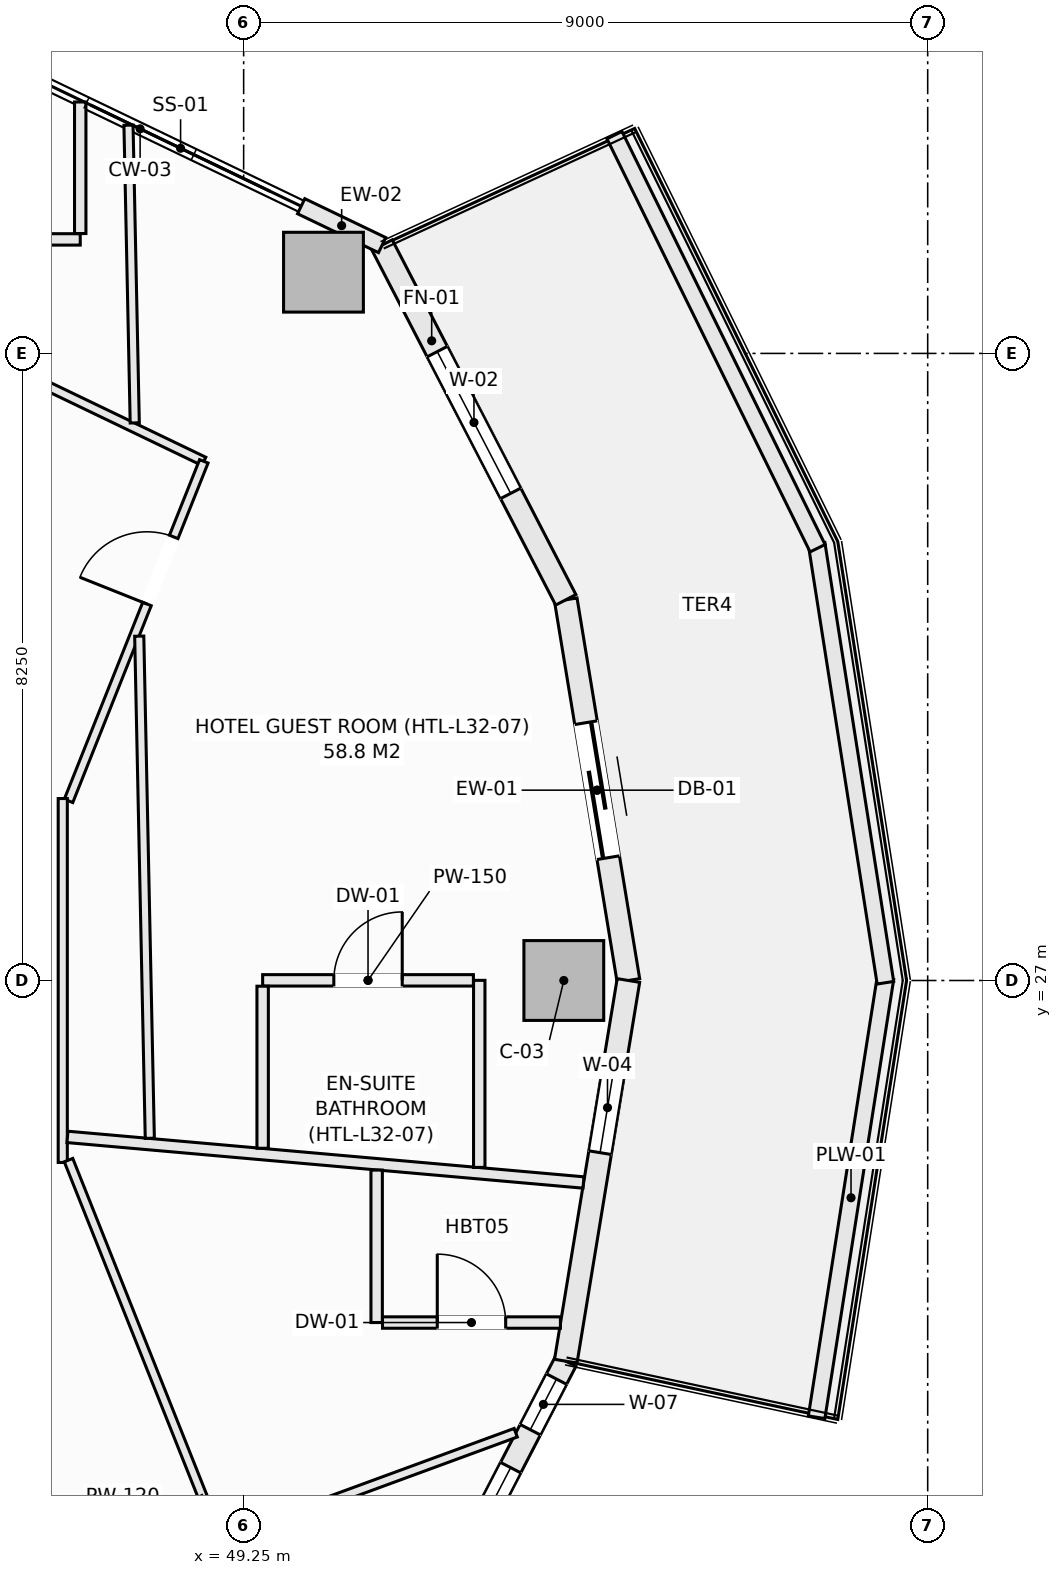
"""IFC4 building model, lengths in metres.
Left out: names, types, materials, properties, quantities, classifications, styles, units other than length and angle.
Written with IfcOpenShell. Run it as: python <this file> out.ifc"""

import sys

from ifc_helpers import new_model, si_unit, direction, frame, frame_2d, origin, origin_2d, place, context, subcontext, project, spatial, rectangle, extrude, element, fill, save


model = new_model("IFC4")
c1 = context("Model", 3, precision=1e-05, world=origin(), true_north=direction((0.0, 1.0)))
c2 = subcontext(c1, "Body", "Model", "MODEL_VIEW")
j1 = project(units=[si_unit("LENGTHUNIT", "METRE"), si_unit("PLANEANGLEUNIT", "RADIAN")], contexts=[c1])
p1 = place(None, origin())
s1 = spatial("IfcSite", under=j1, at=p1, CompositionType="ELEMENT")
p2 = place(p1, origin())
s2 = spatial("IfcBuilding", under=s1, at=p2, CompositionType="ELEMENT")
p3 = place(p2, frame((0.0, 0.0, 129.1)))
s3 = spatial("IfcBuildingStorey", under=s2, at=p3, CompositionType="ELEMENT", Elevation=129.1)
for number, where, z_axis, x_axis in (
    (1, (53.462, 27.0, -0.27), (0.0, 0.0, 1.0), (1.0, 0.0, 0.0)),
    (2, (50.3, 36.319, -0.27), (0.0, 0.0, 1.0), (1.0, 0.0, 0.0)),
):
    element("IfcColumn", number, at=place(p3, frame(where, z_axis=z_axis, x_axis=x_axis)), inside=s3, PredefinedType="COLUMN", context=c2, shape_type="SweptSolid", body=[
        extrude(rectangle(XDim=1.05, YDim=1.05, at=origin_2d()), origin(), (0.0, 0.0, 1.0), 3.4),
    ])
p4 = place(p3, frame((53.488, 32.008, 0.0), z_axis=(0.0, 0.0, 1.0), x_axis=(0.162393944769, -0.986726003864, 0.0)))
e3 = element("IfcWall", 3, at=p4, inside=s3, PredefinedType="SOLIDWALL", context=c2, shape_type="SweptSolid", body=[
    extrude(rectangle(XDim=5.075, YDim=0.3, at=frame_2d((2.538, 0.0))), origin(), (0.0, 0.0, 1.0), 2.653),
])
p5 = place(p4, frame((1.638, 0.0, 0.0)))
e4 = element("IfcOpeningElement", 4, at=p5, cuts=e3, PredefinedType="OPENING", context=c2, shape_type="SweptSolid", body=[
    extrude(rectangle(XDim=1.8, YDim=2.25, at=frame_2d((0.9, 1.125))), frame((0.0, 0.16, 0.0), z_axis=(0.0, -1.0, 0.0), x_axis=(1.0, 0.0, 0.0)), (0.0, 0.0, 1.0), 0.32),
])
p6 = place(p3, frame((51.072, 36.675, 0.0), z_axis=(0.0, 0.0, 1.0), x_axis=(0.459767899643, -0.888039119892, 0.0)))
e5 = element("IfcWall", 5, at=p6, inside=s3, PredefinedType="SOLIDWALL", context=c2, shape_type="SweptSolid", body=[
    extrude(rectangle(XDim=5.255, YDim=0.3, at=frame_2d((2.628, 0.0))), origin(), (0.0, 0.0, 1.0), 2.653),
])
p7 = place(p6, frame((1.578, 0.0, 0.74)))
e6 = element("IfcOpeningElement", 6, at=p7, cuts=e5, PredefinedType="OPENING", context=c2, shape_type="SweptSolid", body=[
    extrude(rectangle(XDim=2.1, YDim=1.7, at=frame_2d((1.05, 0.85))), frame((0.0, 0.16, 0.0), z_axis=(0.0, -1.0, 0.0), x_axis=(1.0, 0.0, 0.0)), (0.0, 0.0, 1.0), 0.32),
])
p8 = place(p3, frame((50.007, 37.187, 0.0), z_axis=(0.0, 0.0, 1.0), x_axis=(0.90138115854, -0.433026566193, 0.0)))
e7 = element("IfcWall", 7, at=p8, inside=s3, PredefinedType="SOLIDWALL", context=c2, shape_type="SweptSolid", body=[
    extrude(rectangle(XDim=1.182, YDim=0.22, at=frame_2d((0.591, 0.0))), origin(), (0.0, 0.0, 1.0), 2.653),
])
p9 = place(p3, frame((51.072, 17.325, 0.0), z_axis=(0.0, 0.0, 1.0), x_axis=(0.459767899643, 0.888039119892, 0.0)))
e8 = element("IfcWall", 8, at=p9, inside=s3, PredefinedType="SOLIDWALL", context=c2, shape_type="SweptSolid", body=[
    extrude(rectangle(XDim=5.255, YDim=0.3, at=frame_2d((2.628, 0.0))), origin(), (0.0, 0.0, 1.0), 2.653),
])
p10 = place(p9, frame((1.578, 0.0, 0.74)))
e9 = element("IfcOpeningElement", 9, at=p10, cuts=e8, PredefinedType="OPENING", context=c2, shape_type="SweptSolid", body=[
    extrude(rectangle(XDim=2.1, YDim=1.7, at=frame_2d((1.05, 0.85))), frame((0.0, 0.16, 0.0), z_axis=(0.0, -1.0, 0.0), x_axis=(1.0, 0.0, 0.0)), (0.0, 0.0, 1.0), 0.32),
])
p11 = place(p9, frame((4.24, 0.0, 0.72)))
e10 = element("IfcOpeningElement", 10, at=p11, cuts=e8, PredefinedType="OPENING", context=c2, shape_type="SweptSolid", body=[
    extrude(rectangle(XDim=0.75, YDim=1.65, at=frame_2d((0.375, 0.825))), frame((0.0, 0.16, 0.0), z_axis=(0.0, -1.0, 0.0), x_axis=(1.0, 0.0, 0.0)), (0.0, 0.0, 1.0), 0.32),
])
p12 = place(p3, frame((53.488, 21.992, 0.0), z_axis=(0.0, 0.0, 1.0), x_axis=(0.162393944769, 0.986726003864, 0.0)))
e11 = element("IfcWall", 11, at=p12, inside=s3, PredefinedType="SOLIDWALL", context=c2, shape_type="SweptSolid", body=[
    extrude(rectangle(XDim=5.075, YDim=0.3, at=frame_2d((2.538, 0.0))), origin(), (0.0, 0.0, 1.0), 2.653),
])
p13 = place(p12, frame((2.78, 0.0, 0.72)))
e12 = element("IfcOpeningElement", 12, at=p13, cuts=e11, PredefinedType="OPENING", context=c2, shape_type="SweptSolid", body=[
    extrude(rectangle(XDim=1.2, YDim=1.65, at=frame_2d((0.6, 0.825))), frame((0.0, 0.16, 0.0), z_axis=(0.0, -1.0, 0.0), x_axis=(1.0, 0.0, 0.0)), (0.0, 0.0, 1.0), 0.32),
])
for number, where, z_axis, x_axis in (
    (13, (56.789, 21.254, 0.0), (0.0, 0.0, 1.0), (0.155, 0.988, 0.0)),
    (14, (56.789, 32.746, 0.0), (0.0, 0.0, 1.0), (0.155, -0.988, 0.0)),
):
    element("IfcWall", number, at=place(p3, frame(where, z_axis=z_axis, x_axis=x_axis)), inside=s3, PredefinedType="PARAPET", context=c2, shape_type="SweptSolid", body=[
        extrude(rectangle(XDim=5.846, YDim=0.22, at=frame_2d((2.923, 0.0))), origin(), (0.0, 0.0, 1.0), 0.52),
    ])
p14 = place(p3, frame((54.129, 38.122, 0.0), z_axis=(0.0, 0.0, 1.0), x_axis=(0.441269631716, -0.897374566235, 0.0)))
e15 = element("IfcWall", 15, at=p14, inside=s3, PredefinedType="PARAPET", context=c2, shape_type="SweptSolid", body=[
    extrude(rectangle(XDim=6.056, YDim=0.22, at=frame_2d((3.028, 0.0))), origin(), (0.0, 0.0, 1.0), 0.52),
])
p15 = place(p3, frame((46.65, 34.828, 0.0), z_axis=(0.0, 0.0, 1.0), x_axis=(0.901271525254, -0.433254703109, 0.0)))
e16 = element("IfcWall", 16, at=p15, inside=s3, PredefinedType="PARTITIONING", context=c2, shape_type="SweptSolid", body=[
    extrude(rectangle(XDim=2.304, YDim=0.12, at=frame_2d((1.152, 0.0))), origin(), (0.0, 0.0, 1.0), 3.13),
])
p16 = place(p3, frame((46.946, 29.363, 0.0), z_axis=(0.0, 0.0, 1.0), x_axis=(0.370173596818, 0.928962597858, 0.0)))
e17 = element("IfcWall", 17, at=p16, inside=s3, PredefinedType="PARTITIONING", context=c2, shape_type="SweptSolid", body=[
    extrude(rectangle(XDim=4.809, YDim=0.12, at=frame_2d((2.404, 0.0))), origin(), (0.0, 0.0, 1.0), 3.13),
])
p17 = place(p16, frame((2.788, 0.0, 0.0)))
e18 = element("IfcOpeningElement", 18, at=p17, cuts=e17, PredefinedType="OPENING", context=c2, shape_type="SweptSolid", body=[
    extrude(rectangle(XDim=0.95, YDim=2.1, at=frame_2d((0.475, 1.05))), frame((0.0, 0.07, 0.0), z_axis=(0.0, -1.0, 0.0), x_axis=(1.0, 0.0, 0.0)), (0.0, 0.0, 1.0), 0.14),
])
p18 = place(p3, frame((46.87, 24.606, 0.0), z_axis=(0.0, 0.0, 1.0), x_axis=(0.0, 1.0, 0.0)))
e19 = element("IfcWall", 19, at=p18, inside=s3, PredefinedType="PARTITIONING", context=c2, shape_type="SweptSolid", body=[
    extrude(rectangle(XDim=4.788, YDim=0.12, at=frame_2d((2.394, 0.0))), origin(), (0.0, 0.0, 1.0), 3.13),
])
p19 = place(p3, frame((46.946, 24.637, 0.0), z_axis=(0.0, 0.0, 1.0), x_axis=(0.370173596818, -0.928962597858, 0.0)))
e20 = element("IfcWall", 20, at=p19, inside=s3, PredefinedType="PARTITIONING", context=c2, shape_type="SweptSolid", body=[
    extrude(rectangle(XDim=4.809, YDim=0.12, at=frame_2d((2.404, 0.0))), origin(), (0.0, 0.0, 1.0), 3.13),
])
p20 = place(p3, frame((46.932, 24.942, 0.0), z_axis=(0.0, 0.0, 1.0), x_axis=(0.996119604576, -0.088009848195, 0.0)))
e21 = element("IfcWall", 21, at=p20, inside=s3, PredefinedType="PARTITIONING", context=c2, shape_type="SweptSolid", body=[
    extrude(rectangle(XDim=6.816, YDim=0.15, at=frame_2d((3.408, 0.0))), origin(), (0.0, 0.0, 1.0), 3.13),
])
p21 = place(p3, frame((39.082, 16.003, 0.0), z_axis=(0.0, 0.0, 1.0), x_axis=(0.93872535699, 0.344666076288, 0.0)))
e22 = element("IfcWall", 22, at=p21, inside=s3, PredefinedType="PARTITIONING", context=c2, shape_type="SweptSolid", body=[
    extrude(rectangle(XDim=14.645, YDim=0.12, at=frame_2d((7.323, 0.0))), origin(), (0.0, 0.0, 1.0), 3.13),
])
p22 = place(p3, frame((51.0, 22.5, 0.0), z_axis=(0.0, 0.0, 1.0), x_axis=(0.0, 1.0, 0.0)))
e23 = element("IfcWall", 23, at=p22, inside=s3, PredefinedType="PARTITIONING", context=c2, shape_type="SweptSolid", body=[
    extrude(rectangle(XDim=2.006, YDim=0.15, at=frame_2d((1.003, 0.0))), origin(), (0.0, 0.0, 1.0), 3.13),
])
p23 = place(p3, frame((51.077, 22.5, 0.0), z_axis=(0.0, 0.0, 1.0), x_axis=(1.0, 0.0, 0.0)))
e24 = element("IfcWall", 24, at=p23, inside=s3, PredefinedType="PARTITIONING", context=c2, shape_type="SweptSolid", body=[
    extrude(rectangle(XDim=2.341, YDim=0.15, at=frame_2d((1.17, 0.0))), origin(), (0.0, 0.0, 1.0), 2.812),
])
p24 = place(p23, frame((0.72, 0.0, 0.0)))
e25 = element("IfcOpeningElement", 25, at=p24, cuts=e24, PredefinedType="OPENING", context=c2, shape_type="SweptSolid", body=[
    extrude(rectangle(XDim=0.9, YDim=2.1, at=frame_2d((0.45, 1.05))), frame((0.0, 0.085, 0.0), z_axis=(0.0, -1.0, 0.0), x_axis=(1.0, 0.0, 0.0)), (0.0, 0.0, 1.0), 0.17),
])
p25 = place(p3, frame((52.35, 24.541, 0.0), z_axis=(0.0, 0.0, 1.0), x_axis=(0.0, 1.0, 0.0)))
e26 = element("IfcWall", 26, at=p25, inside=s3, PredefinedType="PARTITIONING", context=c2, shape_type="SweptSolid", body=[
    extrude(rectangle(XDim=2.461, YDim=0.15, at=frame_2d((1.23, 0.0))), origin(), (0.0, 0.0, 1.0), 3.13),
])
p26 = place(p3, frame((49.5, 27.002, 0.0), z_axis=(0.0, 0.0, 1.0), x_axis=(1.0, 0.0, 0.0)))
e27 = element("IfcWall", 27, at=p26, inside=s3, PredefinedType="PARTITIONING", context=c2, shape_type="SweptSolid", body=[
    extrude(rectangle(XDim=2.773, YDim=0.15, at=frame_2d((1.386, 0.0))), origin(), (0.0, 0.0, 1.0), 2.505),
])
p27 = place(p26, frame((0.937, 0.0, 0.0)))
e28 = element("IfcOpeningElement", 28, at=p27, cuts=e27, PredefinedType="OPENING", context=c2, shape_type="SweptSolid", body=[
    extrude(rectangle(XDim=0.9, YDim=2.1, at=frame_2d((0.45, 1.05))), frame((0.0, 0.085, 0.0), z_axis=(0.0, -1.0, 0.0), x_axis=(1.0, 0.0, 0.0)), (0.0, 0.0, 1.0), 0.17),
])
p28 = place(p3, frame((49.5, 24.793, 0.0), z_axis=(0.0, 0.0, 1.0), x_axis=(0.0, 1.0, 0.0)))
e29 = element("IfcWall", 29, at=p28, inside=s3, PredefinedType="PARTITIONING", context=c2, shape_type="SweptSolid", body=[
    extrude(rectangle(XDim=2.132, YDim=0.15, at=frame_2d((1.066, 0.0))), origin(), (0.0, 0.0, 1.0), 3.13),
])
p29 = place(p3, frame((47.735, 38.253, 0.0), z_axis=(0.0, 0.0, 1.0), x_axis=(0.02106239212, -0.999778163213, 0.0)))
e30 = element("IfcWall", 30, at=p29, inside=s3, PredefinedType="PARTITIONING", context=c2, shape_type="SweptSolid", body=[
    extrude(rectangle(XDim=3.918, YDim=0.12, at=frame_2d((1.959, 0.0))), origin(), (0.0, 0.0, 1.0), 3.13),
])
p30 = place(p3, frame((47.876, 31.53, 0.0), z_axis=(0.0, 0.0, 1.0), x_axis=(0.021060407881, -0.999778205013, 0.0)))
e31 = element("IfcWall", 31, at=p30, inside=s3, PredefinedType="PARTITIONING", context=c2, shape_type="SweptSolid", body=[
    extrude(rectangle(XDim=6.608, YDim=0.12, at=frame_2d((3.304, 0.0))), origin(), (0.0, 0.0, 1.0), 3.13),
])
p31 = place(p3, frame((44.225, 36.75, 0.0), z_axis=(0.0, 0.0, 1.0), x_axis=(1.0, 0.0, 0.0)))
e32 = element("IfcWall", 32, at=p31, inside=s3, PredefinedType="PARTITIONING", context=c2, shape_type="SweptSolid", body=[
    extrude(rectangle(XDim=2.875, YDim=0.15, at=frame_2d((1.438, 0.0))), origin(), (0.0, 0.0, 1.0), 3.13),
])
p32 = place(p31, frame((0.988, 0.0, 0.0)))
e33 = element("IfcOpeningElement", 33, at=p32, cuts=e32, PredefinedType="OPENING", context=c2, shape_type="SweptSolid", body=[
    extrude(rectangle(XDim=0.9, YDim=2.1, at=frame_2d((0.45, 1.05))), frame((0.0, 0.085, 0.0), z_axis=(0.0, -1.0, 0.0), x_axis=(1.0, 0.0, 0.0)), (0.0, 0.0, 1.0), 0.17),
])
p33 = place(p3, frame((47.1, 36.827, 0.0), z_axis=(0.0, 0.0, 1.0), x_axis=(0.0, 1.0, 0.0)))
e34 = element("IfcWall", 34, at=p33, inside=s3, PredefinedType="PARTITIONING", context=c2, shape_type="SweptSolid", body=[
    extrude(rectangle(XDim=1.731, YDim=0.15, at=frame_2d((0.865, 0.0))), origin(), (0.0, 0.0, 1.0), 3.13),
])
p34 = place(p5, origin())
e35 = element("IfcDoor", 35, at=p34, inside=s3, OperationType="SLIDING_TO_LEFT", PredefinedType="DOOR", context=c2, shape_type="SweptSolid", body=[
    extrude(rectangle(XDim=1.8, YDim=2.25, at=frame_2d((0.9, 1.125))), frame((0.0, 0.025, 0.0), z_axis=(0.0, -1.0, 0.0), x_axis=(1.0, 0.0, 0.0)), (0.0, 0.0, 1.0), 0.05),
])
fill(e4, e35)
p35 = place(p7, origin())
e36 = element("IfcWindow", 36, at=p35, inside=s3, PartitioningType="SINGLE_PANEL", PredefinedType="WINDOW", context=c2, shape_type="SweptSolid", body=[
    extrude(rectangle(XDim=2.1, YDim=1.7, at=frame_2d((1.05, 0.85))), frame((0.0, 0.03, 0.0), z_axis=(0.0, -1.0, 0.0), x_axis=(1.0, 0.0, 0.0)), (0.0, 0.0, 1.0), 0.06),
])
fill(e6, e36)
p36 = place(p10, origin())
e37 = element("IfcWindow", 37, at=p36, inside=s3, PartitioningType="SINGLE_PANEL", PredefinedType="WINDOW", context=c2, shape_type="SweptSolid", body=[
    extrude(rectangle(XDim=2.1, YDim=1.7, at=frame_2d((1.05, 0.85))), frame((0.0, 0.03, 0.0), z_axis=(0.0, -1.0, 0.0), x_axis=(1.0, 0.0, 0.0)), (0.0, 0.0, 1.0), 0.06),
])
fill(e9, e37)
p37 = place(p13, origin())
e38 = element("IfcWindow", 38, at=p37, inside=s3, PartitioningType="SINGLE_PANEL", PredefinedType="WINDOW", context=c2, shape_type="SweptSolid", body=[
    extrude(rectangle(XDim=1.2, YDim=1.65, at=frame_2d((0.6, 0.825))), frame((0.0, 0.03, 0.0), z_axis=(0.0, -1.0, 0.0), x_axis=(1.0, 0.0, 0.0)), (0.0, 0.0, 1.0), 0.06),
])
fill(e12, e38)
p38 = place(p17, origin())
e39 = element("IfcDoor", 39, at=p38, inside=s3, OperationType="SINGLE_SWING_LEFT", PredefinedType="DOOR", context=c2, shape_type="SweptSolid", body=[
    extrude(rectangle(XDim=0.95, YDim=2.1, at=frame_2d((0.475, 1.05))), frame((0.0, 0.025, 0.0), z_axis=(0.0, -1.0, 0.0), x_axis=(1.0, 0.0, 0.0)), (0.0, 0.0, 1.0), 0.05),
])
fill(e18, e39)
p39 = place(p24, origin())
e40 = element("IfcDoor", 40, at=p39, inside=s3, OperationType="SINGLE_SWING_LEFT", PredefinedType="DOOR", context=c2, shape_type="SweptSolid", body=[
    extrude(rectangle(XDim=0.9, YDim=2.1, at=frame_2d((0.45, 1.05))), frame((0.0, 0.025, 0.0), z_axis=(0.0, -1.0, 0.0), x_axis=(1.0, 0.0, 0.0)), (0.0, 0.0, 1.0), 0.05),
])
fill(e25, e40)
p40 = place(p27, origin())
e41 = element("IfcDoor", 41, at=p40, inside=s3, OperationType="SINGLE_SWING_RIGHT", PredefinedType="DOOR", context=c2, shape_type="SweptSolid", body=[
    extrude(rectangle(XDim=0.9, YDim=2.1, at=frame_2d((0.45, 1.05))), frame((0.0, 0.025, 0.0), z_axis=(0.0, -1.0, 0.0), x_axis=(1.0, 0.0, 0.0)), (0.0, 0.0, 1.0), 0.05),
])
fill(e28, e41)
p41 = place(p11, origin())
e42 = element("IfcWindow", 42, at=p41, inside=s3, PartitioningType="SINGLE_PANEL", PredefinedType="WINDOW", context=c2, shape_type="SweptSolid", body=[
    extrude(rectangle(XDim=0.75, YDim=1.65, at=frame_2d((0.375, 0.825))), frame((0.0, 0.03, 0.0), z_axis=(0.0, -1.0, 0.0), x_axis=(1.0, 0.0, 0.0)), (0.0, 0.0, 1.0), 0.06),
])
fill(e10, e42)
save(model, sys.argv[1])
